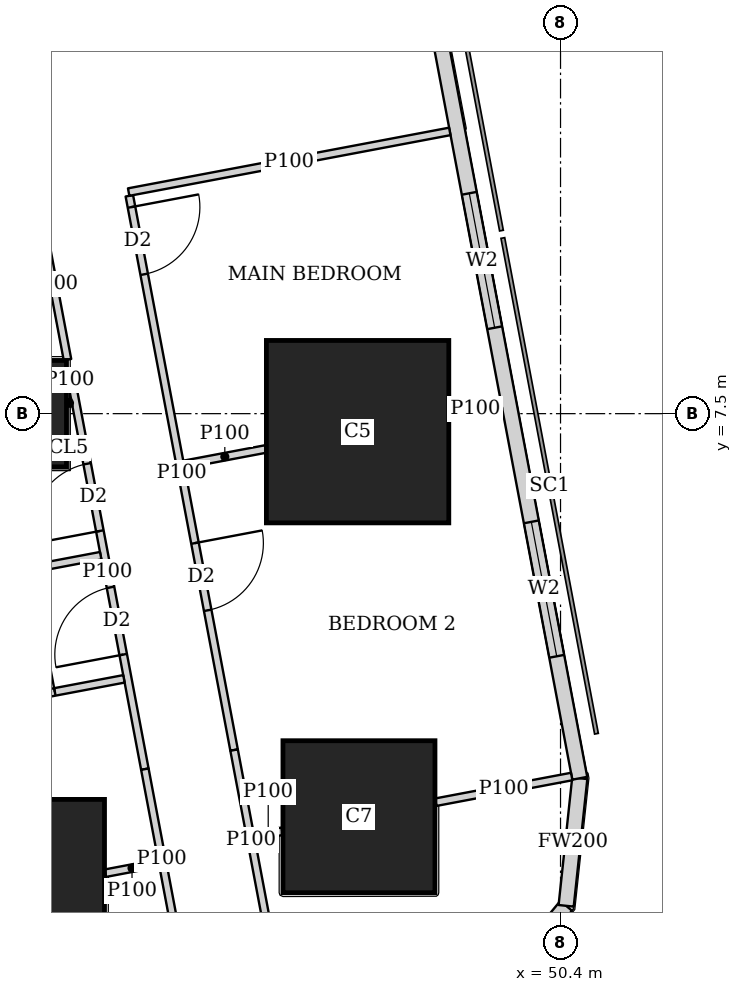
"""IFC4 building model, lengths in metres.
Left out: names, types, materials, properties, quantities, classifications, styles, units other than length and angle.
Written with IfcOpenShell. Run it as: python <this file> out.ifc"""

import sys

from ifc_helpers import new_model, si_unit, direction, frame, frame_2d, origin, origin_2d, place, context, subcontext, project, spatial, rectangle, extrude, element, fill, save


model = new_model("IFC4")
c1 = context("Model", 3, precision=1e-05, world=origin(), true_north=direction((0.0, 1.0)))
c2 = subcontext(c1, "Body", "Model", "MODEL_VIEW")
j1 = project(units=[si_unit("LENGTHUNIT", "METRE"), si_unit("PLANEANGLEUNIT", "RADIAN")], contexts=[c1])
p1 = place(None, origin())
s1 = spatial("IfcSite", under=j1, at=p1, CompositionType="ELEMENT")
p2 = place(p1, origin())
s2 = spatial("IfcBuilding", under=s1, at=p2, CompositionType="ELEMENT")
p3 = place(p2, frame((0.0, 0.0, 223.7)))
s3 = spatial("IfcBuildingStorey", under=s2, at=p3, CompositionType="ELEMENT", Elevation=223.7)
p4 = place(p3, frame((43.2, 1.225, 0.0), z_axis=(0.0, 0.0, 1.0), x_axis=(1.0, 0.0, 0.0)))
e1 = element("IfcColumn", 1, at=p4, inside=s3, PredefinedType="COLUMN", context=c2, shape_type="SweptSolid", body=[
    extrude(rectangle(XDim=2.4, YDim=2.4, at=origin_2d()), origin(), (0.0, 0.0, 1.0), 3.75),
])
p5 = place(p3, frame((47.748, 2.197, 0.0), z_axis=(0.0, 0.0, 1.0), x_axis=(1.0, 0.0, 0.0)))
e2 = element("IfcColumn", 2, at=p5, inside=s3, PredefinedType="COLUMN", context=c2, shape_type="SweptSolid", body=[
    extrude(rectangle(XDim=2.0, YDim=2.0, at=origin_2d()), origin(), (0.0, 0.0, 1.0), 3.75),
])
p6 = place(p3, frame((43.2, 7.5, 0.0), z_axis=(0.0, 0.0, 1.0), x_axis=(1.0, 0.0, 0.0)))
e3 = element("IfcColumn", 3, at=p6, inside=s3, PredefinedType="COLUMN", context=c2, shape_type="SweptSolid", body=[
    extrude(rectangle(XDim=1.4, YDim=1.4, at=origin_2d()), origin(), (0.0, 0.0, 1.0), 3.75),
])
p7 = place(p3, frame((47.73, 7.263, 0.0), z_axis=(0.0, 0.0, 1.0), x_axis=(1.0, 0.0, 0.0)))
e4 = element("IfcColumn", 4, at=p7, inside=s3, PredefinedType="COLUMN", context=c2, shape_type="SweptSolid", body=[
    extrude(rectangle(XDim=2.4, YDim=2.4, at=origin_2d()), origin(), (0.0, 0.0, 1.0), 3.75),
])
p8 = place(p3, frame((49.407, -0.263, 0.0), z_axis=(0.0, 0.0, 1.0), x_axis=(0.638042593423, 0.770001070764, 0.0)))
e5 = element("IfcWall", 5, at=p8, inside=s3, PredefinedType="SOLIDWALL", context=c2, shape_type="SweptSolid", body=[
    extrude(rectangle(XDim=1.673, YDim=0.2, at=frame_2d((0.836, 0.0))), origin(), (0.0, 0.0, 1.0), 3.5),
])
p9 = place(p3, frame((50.474, 1.025, 0.0), z_axis=(0.0, 0.0, 1.0), x_axis=(0.106047815515, 0.994361031429, 0.0)))
e6 = element("IfcWall", 6, at=p9, inside=s3, PredefinedType="SOLIDWALL", context=c2, shape_type="SweptSolid", body=[
    extrude(rectangle(XDim=1.688, YDim=0.2, at=frame_2d((0.844, 0.0))), origin(), (0.0, 0.0, 1.0), 3.5),
])
p10 = place(p3, frame((50.653, 2.703, 0.0), z_axis=(0.0, 0.0, 1.0), x_axis=(-0.185612026696, 0.982623109613, 0.0)))
e7 = element("IfcWall", 7, at=p10, inside=s3, PredefinedType="SOLIDWALL", context=c2, shape_type="SweptSolid", body=[
    extrude(rectangle(XDim=41.393, YDim=0.2, at=frame_2d((20.697, 0.0))), origin(), (0.0, 0.0, 1.0), 3.5),
])
p11 = place(p10, frame((1.633, 0.0, 0.9)))
e8 = element("IfcOpeningElement", 8, at=p11, cuts=e7, PredefinedType="OPENING", context=c2, shape_type="SweptSolid", body=[
    extrude(rectangle(XDim=1.8, YDim=1.5, at=frame_2d((0.9, 0.75))), frame((0.0, 0.11, 0.0), z_axis=(0.0, -1.0, 0.0), x_axis=(1.0, 0.0, 0.0)), (0.0, 0.0, 1.0), 0.22),
])
p12 = place(p10, frame((6.032, 0.0, 0.9)))
e9 = element("IfcOpeningElement", 9, at=p12, cuts=e7, PredefinedType="OPENING", context=c2, shape_type="SweptSolid", body=[
    extrude(rectangle(XDim=1.8, YDim=1.5, at=frame_2d((0.9, 0.75))), frame((0.0, 0.11, 0.0), z_axis=(0.0, -1.0, 0.0), x_axis=(1.0, 0.0, 0.0)), (0.0, 0.0, 1.0), 0.22),
])
p13 = place(p10, frame((9.848, 0.0, 0.9)))
e10 = element("IfcOpeningElement", 10, at=p13, cuts=e7, PredefinedType="OPENING", context=c2, shape_type="SweptSolid", body=[
    extrude(rectangle(XDim=1.8, YDim=1.5, at=frame_2d((0.9, 0.75))), frame((0.0, 0.11, 0.0), z_axis=(0.0, -1.0, 0.0), x_axis=(1.0, 0.0, 0.0)), (0.0, 0.0, 1.0), 0.22),
])
p14 = place(p10, frame((13.664, 0.0, 0.9)))
e11 = element("IfcOpeningElement", 11, at=p14, cuts=e7, PredefinedType="OPENING", context=c2, shape_type="SweptSolid", body=[
    extrude(rectangle(XDim=1.8, YDim=1.5, at=frame_2d((0.9, 0.75))), frame((0.0, 0.11, 0.0), z_axis=(0.0, -1.0, 0.0), x_axis=(1.0, 0.0, 0.0)), (0.0, 0.0, 1.0), 0.22),
])
p15 = place(p10, frame((17.481, 0.0, 0.9)))
e12 = element("IfcOpeningElement", 12, at=p15, cuts=e7, PredefinedType="OPENING", context=c2, shape_type="SweptSolid", body=[
    extrude(rectangle(XDim=1.8, YDim=1.5, at=frame_2d((0.9, 0.75))), frame((0.0, 0.11, 0.0), z_axis=(0.0, -1.0, 0.0), x_axis=(1.0, 0.0, 0.0)), (0.0, 0.0, 1.0), 0.22),
])
p16 = place(p10, frame((21.297, 0.0, 0.9)))
e13 = element("IfcOpeningElement", 13, at=p16, cuts=e7, PredefinedType="OPENING", context=c2, shape_type="SweptSolid", body=[
    extrude(rectangle(XDim=1.8, YDim=1.5, at=frame_2d((0.9, 0.75))), frame((0.0, 0.11, 0.0), z_axis=(0.0, -1.0, 0.0), x_axis=(1.0, 0.0, 0.0)), (0.0, 0.0, 1.0), 0.22),
])
p17 = place(p10, frame((25.113, 0.0, 0.9)))
e14 = element("IfcOpeningElement", 14, at=p17, cuts=e7, PredefinedType="OPENING", context=c2, shape_type="SweptSolid", body=[
    extrude(rectangle(XDim=1.8, YDim=1.5, at=frame_2d((0.9, 0.75))), frame((0.0, 0.11, 0.0), z_axis=(0.0, -1.0, 0.0), x_axis=(1.0, 0.0, 0.0)), (0.0, 0.0, 1.0), 0.22),
])
p18 = place(p10, frame((28.93, 0.0, 0.9)))
e15 = element("IfcOpeningElement", 15, at=p18, cuts=e7, PredefinedType="OPENING", context=c2, shape_type="SweptSolid", body=[
    extrude(rectangle(XDim=1.8, YDim=1.5, at=frame_2d((0.9, 0.75))), frame((0.0, 0.11, 0.0), z_axis=(0.0, -1.0, 0.0), x_axis=(1.0, 0.0, 0.0)), (0.0, 0.0, 1.0), 0.22),
])
p19 = place(p10, frame((32.746, 0.0, 0.9)))
e16 = element("IfcOpeningElement", 16, at=p19, cuts=e7, PredefinedType="OPENING", context=c2, shape_type="SweptSolid", body=[
    extrude(rectangle(XDim=1.8, YDim=1.5, at=frame_2d((0.9, 0.75))), frame((0.0, 0.11, 0.0), z_axis=(0.0, -1.0, 0.0), x_axis=(1.0, 0.0, 0.0)), (0.0, 0.0, 1.0), 0.22),
])
p20 = place(p10, frame((36.481, 0.0, 0.9)))
e17 = element("IfcOpeningElement", 17, at=p20, cuts=e7, PredefinedType="OPENING", context=c2, shape_type="SweptSolid", body=[
    extrude(rectangle(XDim=1.8, YDim=1.5, at=frame_2d((0.9, 0.75))), frame((0.0, 0.11, 0.0), z_axis=(0.0, -1.0, 0.0), x_axis=(1.0, 0.0, 0.0)), (0.0, 0.0, 1.0), 0.22),
])
p21 = place(p3, frame((44.727, 10.366, 0.0), z_axis=(0.0, 0.0, 1.0), x_axis=(0.185678775129, -0.982610498858, 0.0)))
e18 = element("IfcWall", 18, at=p21, inside=s3, PredefinedType="PARTITIONING", context=c2, shape_type="SweptSolid", body=[
    extrude(rectangle(XDim=7.421, YDim=0.1, at=frame_2d((3.71, 0.0))), origin(), (0.0, 0.0, 1.0), 3.5),
])
p22 = place(p21, frame((0.151, 0.0, 0.0)))
e19 = element("IfcOpeningElement", 19, at=p22, cuts=e18, PredefinedType="OPENING", context=c2, shape_type="SweptSolid", body=[
    extrude(rectangle(XDim=0.9, YDim=2.1, at=frame_2d((0.45, 1.05))), frame((0.0, 0.06, 0.0), z_axis=(0.0, -1.0, 0.0), x_axis=(1.0, 0.0, 0.0)), (0.0, 0.0, 1.0), 0.12),
])
p23 = place(p21, frame((4.65, 0.0, 0.0)))
e20 = element("IfcOpeningElement", 20, at=p23, cuts=e18, PredefinedType="OPENING", context=c2, shape_type="SweptSolid", body=[
    extrude(rectangle(XDim=0.9, YDim=2.1, at=frame_2d((0.45, 1.05))), frame((0.0, 0.06, 0.0), z_axis=(0.0, -1.0, 0.0), x_axis=(1.0, 0.0, 0.0)), (0.0, 0.0, 1.0), 0.12),
])
p24 = place(p3, frame((46.105, 3.074, 0.0), z_axis=(0.0, 0.0, 1.0), x_axis=(0.185631845838, -0.982619365681, 0.0)))
e21 = element("IfcWall", 21, at=p24, inside=s3, PredefinedType="PARTITIONING", context=c2, shape_type="SweptSolid", body=[
    extrude(rectangle(XDim=2.403, YDim=0.1, at=frame_2d((1.201, 0.0))), origin(), (0.0, 0.0, 1.0), 2.05),
])
p25 = place(p3, frame((43.539, 10.192, 0.0), z_axis=(0.0, 0.0, 1.0), x_axis=(0.185443145218, -0.982654995353, 0.0)))
e22 = element("IfcWall", 22, at=p25, inside=s3, PredefinedType="PARTITIONING", context=c2, shape_type="SweptSolid", body=[
    extrude(rectangle(XDim=2.017, YDim=0.1, at=frame_2d((1.008, 0.0))), origin(), (0.0, 0.0, 1.0), 3.5),
])
p26 = place(p3, frame((43.949, 8.02, 0.0), z_axis=(0.0, 0.0, 1.0), x_axis=(0.185656792073, -0.982614652627, 0.0)))
e23 = element("IfcWall", 23, at=p26, inside=s3, PredefinedType="PARTITIONING", context=c2, shape_type="SweptSolid", body=[
    extrude(rectangle(XDim=5.289, YDim=0.1, at=frame_2d((2.645, 0.0))), origin(), (0.0, 0.0, 1.0), 3.5),
])
p27 = place(p26, frame((1.2, 0.0, 0.0)))
e24 = element("IfcOpeningElement", 24, at=p27, cuts=e23, PredefinedType="OPENING", context=c2, shape_type="SweptSolid", body=[
    extrude(rectangle(XDim=0.9, YDim=2.1, at=frame_2d((0.45, 1.05))), frame((0.0, 0.06, 0.0), z_axis=(0.0, -1.0, 0.0), x_axis=(1.0, 0.0, 0.0)), (0.0, 0.0, 1.0), 0.12),
])
p28 = place(p26, frame((2.855, 0.0, 0.0)))
e25 = element("IfcOpeningElement", 25, at=p28, cuts=e23, PredefinedType="OPENING", context=c2, shape_type="SweptSolid", body=[
    extrude(rectangle(XDim=0.9, YDim=2.1, at=frame_2d((0.45, 1.05))), frame((0.0, 0.06, 0.0), z_axis=(0.0, -1.0, 0.0), x_axis=(1.0, 0.0, 0.0)), (0.0, 0.0, 1.0), 0.12),
])
p29 = place(p3, frame((44.931, 2.823, 0.0), z_axis=(0.0, 0.0, 1.0), x_axis=(0.185631845838, -0.982619365681, 0.0)))
e26 = element("IfcWall", 26, at=p29, inside=s3, PredefinedType="PARTITIONING", context=c2, shape_type="SweptSolid", body=[
    extrude(rectangle(XDim=2.403, YDim=0.1, at=frame_2d((1.201, 0.0))), origin(), (0.0, 0.0, 1.0), 2.05),
])
p30 = place(p3, frame((48.943, 11.213, 0.0), z_axis=(0.0, 0.0, 1.0), x_axis=(-0.982633535512, -0.185556823879, 0.0)))
e27 = element("IfcWall", 27, at=p30, inside=s3, PredefinedType="PARTITIONING", context=c2, shape_type="SweptSolid", body=[
    extrude(rectangle(XDim=4.3, YDim=0.1, at=frame_2d((2.15, 0.0))), origin(), (0.0, 0.0, 1.0), 2.05),
])
p31 = place(p3, frame((49.622, 7.62, 0.0), z_axis=(0.0, 0.0, 1.0), x_axis=(-0.98254419619, -0.186029305578, 0.0)))
e28 = element("IfcWall", 28, at=p31, inside=s3, PredefinedType="PARTITIONING", context=c2, shape_type="SweptSolid", body=[
    extrude(rectangle(XDim=0.694, YDim=0.1, at=frame_2d((0.347, 0.0))), origin(), (0.0, 0.0, 1.0), 3.5),
])
p32 = place(p3, frame((46.52, 7.035, 0.0), z_axis=(0.0, 0.0, 1.0), x_axis=(-0.982620932907, -0.185623549726, 0.0)))
e29 = element("IfcWall", 29, at=p32, inside=s3, PredefinedType="PARTITIONING", context=c2, shape_type="SweptSolid", body=[
    extrude(rectangle(XDim=1.093, YDim=0.1, at=frame_2d((0.546, 0.0))), origin(), (0.0, 0.0, 1.0), 3.5),
])
p33 = place(p3, frame((50.547, 2.726, 0.0), z_axis=(0.0, 0.0, 1.0), x_axis=(-0.982603988143, -0.185713226471, 0.0)))
e30 = element("IfcWall", 30, at=p33, inside=s3, PredefinedType="PARTITIONING", context=c2, shape_type="SweptSolid", body=[
    extrude(rectangle(XDim=1.821, YDim=0.1, at=frame_2d((0.91, 0.0))), origin(), (0.0, 0.0, 1.0), 2.05),
])
p34 = place(p3, frame((46.738, 2.006, 0.0), z_axis=(0.0, 0.0, 1.0), x_axis=(-0.982820466874, -0.184564161994, 0.0)))
e31 = element("IfcWall", 31, at=p34, inside=s3, PredefinedType="PARTITIONING", context=c2, shape_type="SweptSolid", body=[
    extrude(rectangle(XDim=0.374, YDim=0.1, at=frame_2d((0.187, 0.0))), origin(), (0.0, 0.0, 1.0), 2.05),
])
p35 = place(p3, frame((43.969, 7.646, 0.0), z_axis=(0.0, 0.0, 1.0), x_axis=(-0.983147034646, -0.182816597351, 0.0)))
e32 = element("IfcWall", 32, at=p35, inside=s3, PredefinedType="PARTITIONING", context=c2, shape_type="SweptSolid", body=[
    extrude(rectangle(XDim=0.06, YDim=0.1, at=frame_2d((0.03, 0.0))), origin(), (0.0, 0.0, 1.0), 3.5),
])
p36 = place(p3, frame((45.114, 1.587, 0.0), z_axis=(0.0, 0.0, 1.0), x_axis=(-0.982671022916, -0.185358195723, 0.0)))
e33 = element("IfcWall", 33, at=p36, inside=s3, PredefinedType="PARTITIONING", context=c2, shape_type="SweptSolid", body=[
    extrude(rectangle(XDim=0.717, YDim=0.1, at=frame_2d((0.358, 0.0))), origin(), (0.0, 0.0, 1.0), 2.05),
])
p37 = place(p3, frame((44.35, 5.631, 0.0), z_axis=(0.0, 0.0, 1.0), x_axis=(-0.982638553676, -0.185530247748, 0.0)))
e34 = element("IfcWall", 34, at=p37, inside=s3, PredefinedType="PARTITIONING", context=c2, shape_type="SweptSolid", body=[
    extrude(rectangle(XDim=3.525, YDim=0.1, at=frame_2d((1.763, 0.0))), origin(), (0.0, 0.0, 1.0), 3.5),
])
p38 = place(p3, frame((41.192, 3.356, 0.0), z_axis=(0.0, 0.0, 1.0), x_axis=(0.982588017646, 0.185797706064, 0.0)))
e35 = element("IfcWall", 35, at=p38, inside=s3, PredefinedType="PARTITIONING", context=c2, shape_type="SweptSolid", body=[
    extrude(rectangle(XDim=3.525, YDim=0.1, at=frame_2d((1.763, 0.0))), origin(), (0.0, 0.0, 1.0), 3.5),
])
p39 = place(p38, frame((1.7, 0.0, 0.0)))
e36 = element("IfcOpeningElement", 36, at=p39, cuts=e35, PredefinedType="OPENING", context=c2, shape_type="SweptSolid", body=[
    extrude(rectangle(XDim=0.9, YDim=2.1, at=frame_2d((0.45, 1.05))), frame((0.0, 0.06, 0.0), z_axis=(0.0, -1.0, 0.0), x_axis=(1.0, 0.0, 0.0)), (0.0, 0.0, 1.0), 0.12),
])
p40 = place(p11, origin())
e37 = element("IfcWindow", 37, at=p40, inside=s3, PartitioningType="SINGLE_PANEL", PredefinedType="WINDOW", context=c2, shape_type="SweptSolid", body=[
    extrude(rectangle(XDim=1.8, YDim=1.5, at=frame_2d((0.9, 0.75))), frame((0.0, 0.03, 0.0), z_axis=(0.0, -1.0, 0.0), x_axis=(1.0, 0.0, 0.0)), (0.0, 0.0, 1.0), 0.06),
])
fill(e8, e37)
p41 = place(p12, origin())
e38 = element("IfcWindow", 38, at=p41, inside=s3, PartitioningType="SINGLE_PANEL", PredefinedType="WINDOW", context=c2, shape_type="SweptSolid", body=[
    extrude(rectangle(XDim=1.8, YDim=1.5, at=frame_2d((0.9, 0.75))), frame((0.0, 0.03, 0.0), z_axis=(0.0, -1.0, 0.0), x_axis=(1.0, 0.0, 0.0)), (0.0, 0.0, 1.0), 0.06),
])
fill(e9, e38)
p42 = place(p22, origin())
e39 = element("IfcDoor", 39, at=p42, inside=s3, OperationType="SINGLE_SWING_LEFT", PredefinedType="DOOR", context=c2, shape_type="SweptSolid", body=[
    extrude(rectangle(XDim=0.9, YDim=2.1, at=frame_2d((0.45, 1.05))), frame((0.0, 0.025, 0.0), z_axis=(0.0, -1.0, 0.0), x_axis=(1.0, 0.0, 0.0)), (0.0, 0.0, 1.0), 0.05),
])
fill(e19, e39)
p43 = place(p23, origin())
e40 = element("IfcDoor", 40, at=p43, inside=s3, OperationType="SINGLE_SWING_LEFT", PredefinedType="DOOR", context=c2, shape_type="SweptSolid", body=[
    extrude(rectangle(XDim=0.9, YDim=2.1, at=frame_2d((0.45, 1.05))), frame((0.0, 0.025, 0.0), z_axis=(0.0, -1.0, 0.0), x_axis=(1.0, 0.0, 0.0)), (0.0, 0.0, 1.0), 0.05),
])
fill(e20, e40)
p44 = place(p27, origin())
e41 = element("IfcDoor", 41, at=p44, inside=s3, OperationType="SINGLE_SWING_LEFT", PredefinedType="DOOR", context=c2, shape_type="SweptSolid", body=[
    extrude(rectangle(XDim=0.9, YDim=2.1, at=frame_2d((0.45, 1.05))), frame((0.0, 0.025, 0.0), z_axis=(0.0, -1.0, 0.0), x_axis=(1.0, 0.0, 0.0)), (0.0, 0.0, 1.0), 0.05),
])
fill(e24, e41)
p45 = place(p28, origin())
e42 = element("IfcDoor", 42, at=p45, inside=s3, OperationType="SINGLE_SWING_LEFT", PredefinedType="DOOR", context=c2, shape_type="SweptSolid", body=[
    extrude(rectangle(XDim=0.9, YDim=2.1, at=frame_2d((0.45, 1.05))), frame((0.0, 0.025, 0.0), z_axis=(0.0, -1.0, 0.0), x_axis=(1.0, 0.0, 0.0)), (0.0, 0.0, 1.0), 0.05),
])
fill(e25, e42)
p46 = place(p39, origin())
e43 = element("IfcDoor", 43, at=p46, inside=s3, OperationType="SINGLE_SWING_RIGHT", PredefinedType="DOOR", context=c2, shape_type="SweptSolid", body=[
    extrude(rectangle(XDim=0.9, YDim=2.1, at=frame_2d((0.45, 1.05))), frame((0.0, 0.025, 0.0), z_axis=(0.0, -1.0, 0.0), x_axis=(1.0, 0.0, 0.0)), (0.0, 0.0, 1.0), 0.05),
])
fill(e36, e43)
save(model, sys.argv[1])
